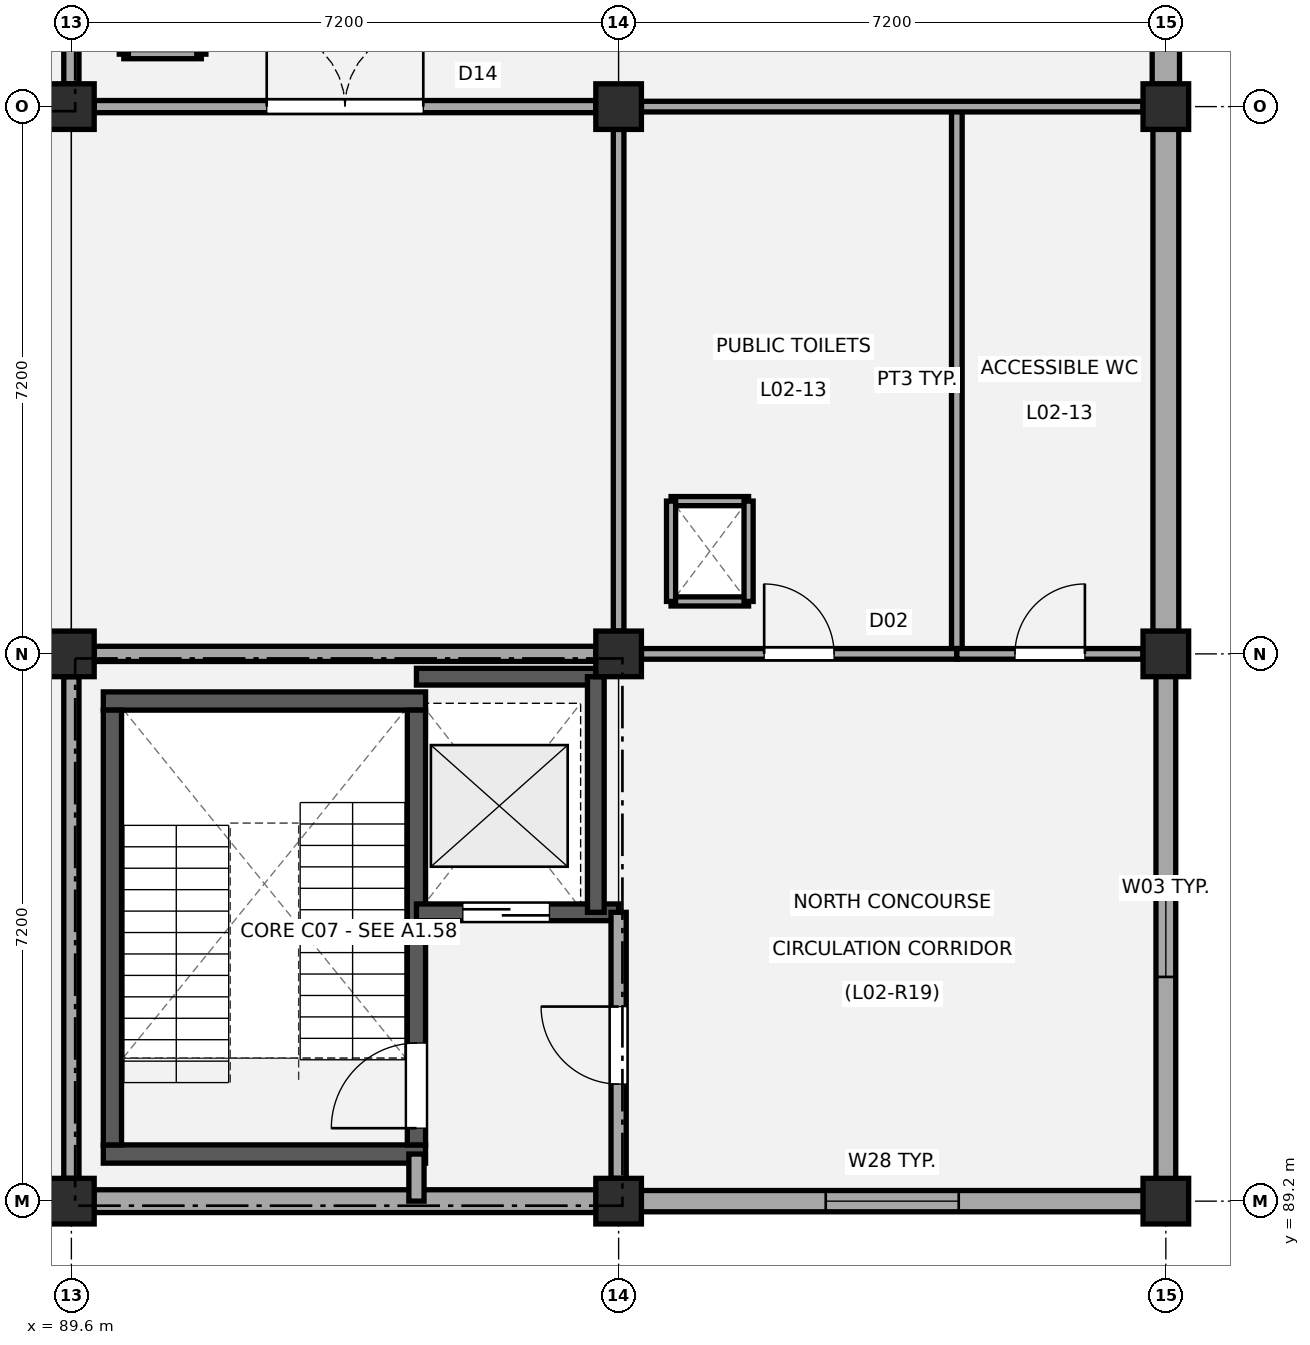
"""IFC4 building model, lengths in metres.
Left out: names, types, materials, properties, quantities, classifications, styles, units other than length and angle.
Written with IfcOpenShell. Run it as: python <this file> out.ifc"""

import sys

from ifc_helpers import new_model, si_unit, direction, frame, frame_2d, origin, origin_2d, place, context, subcontext, project, spatial, rectangle, extrude, element, fill, save


model = new_model("IFC4")
c1 = context("Model", 3, precision=1e-05, world=origin(), true_north=direction((0.0, 1.0)))
c2 = subcontext(c1, "Body", "Model", "MODEL_VIEW")
j1 = project(units=[si_unit("LENGTHUNIT", "METRE"), si_unit("PLANEANGLEUNIT", "RADIAN")], contexts=[c1])
p1 = place(None, origin())
s1 = spatial("IfcSite", under=j1, at=p1, CompositionType="ELEMENT")
p2 = place(p1, origin())
s2 = spatial("IfcBuilding", under=s1, at=p2, CompositionType="ELEMENT")
p3 = place(p2, frame((0.0, 0.0, 9.18)))
s3 = spatial("IfcBuildingStorey", under=s2, at=p3, CompositionType="ELEMENT", Elevation=9.18)
for number, where, z_axis, x_axis in (
    (1, (89.6, 89.2, 0.0), (0.0, 0.0, 1.0), (1.0, 0.0, 0.0)),
    (2, (89.6, 96.4, 0.0), (0.0, 0.0, 1.0), (1.0, 0.0, 0.0)),
    (3, (89.6, 103.6, 0.0), (0.0, 0.0, 1.0), (1.0, 0.0, 0.0)),
    (4, (96.8, 89.2, 0.0), (0.0, 0.0, 1.0), (1.0, 0.0, 0.0)),
    (5, (96.8, 96.4, 0.0), (0.0, 0.0, 1.0), (1.0, 0.0, 0.0)),
    (6, (96.8, 103.6, 0.0), (0.0, 0.0, 1.0), (1.0, 0.0, 0.0)),
    (7, (104.0, 89.2, 0.0), (0.0, 0.0, 1.0), (1.0, 0.0, 0.0)),
    (8, (104.0, 96.4, 0.0), (0.0, 0.0, 1.0), (1.0, 0.0, 0.0)),
    (9, (104.0, 103.6, 0.0), (0.0, 0.0, 1.0), (1.0, 0.0, 0.0)),
):
    element("IfcColumn", number, at=place(p3, frame(where, z_axis=z_axis, x_axis=x_axis)), inside=s3, PredefinedType="COLUMN", context=c2, shape_type="SweptSolid", body=[
        extrude(rectangle(XDim=0.6, YDim=0.6, at=origin_2d()), origin(), (0.0, 0.0, 1.0), 4.32),
    ])
p4 = place(p3, frame((96.505, 89.2, 0.0), z_axis=(0.0, 0.0, 1.0), x_axis=(-1.0, 0.0, 0.0)))
e10 = element("IfcWall", 10, at=p4, inside=s3, PredefinedType="STANDARD", context=c2, shape_type="SweptSolid", body=[
    extrude(rectangle(XDim=6.61, YDim=0.3, at=frame_2d((3.305, 0.0))), origin(), (0.0, 0.0, 1.0), 3.46),
])
p5 = place(p3, frame((103.705, 89.2, 0.0), z_axis=(0.0, 0.0, 1.0), x_axis=(-1.0, 0.0, 0.0)))
e11 = element("IfcWall", 11, at=p5, inside=s3, PredefinedType="STANDARD", context=c2, shape_type="SweptSolid", body=[
    extrude(rectangle(XDim=6.61, YDim=0.28, at=frame_2d((3.305, 0.0))), origin(), (0.0, 0.0, 1.0), 3.48),
])
p6 = place(p5, frame((2.43, 0.0, 0.95)))
e12 = element("IfcOpeningElement", 12, at=p6, cuts=e11, PredefinedType="OPENING", context=c2, shape_type="SweptSolid", body=[
    extrude(rectangle(XDim=1.75, YDim=1.3, at=frame_2d((0.875, 0.65))), frame((0.0, 0.15, 0.0), z_axis=(0.0, -1.0, 0.0), x_axis=(1.0, 0.0, 0.0)), (0.0, 0.0, 1.0), 0.3),
])
p7 = place(p3, frame((104.0, 96.105, 0.0), z_axis=(0.0, 0.0, 1.0), x_axis=(0.0, -1.0, 0.0)))
e13 = element("IfcWall", 13, at=p7, inside=s3, PredefinedType="STANDARD", context=c2, shape_type="SweptSolid", body=[
    extrude(rectangle(XDim=6.61, YDim=0.26, at=frame_2d((3.305, 0.0))), origin(), (0.0, 0.0, 1.0), 3.48),
])
p8 = place(p7, frame((2.655, 0.0, 0.95)))
e14 = element("IfcOpeningElement", 14, at=p8, cuts=e13, PredefinedType="OPENING", context=c2, shape_type="SweptSolid", body=[
    extrude(rectangle(XDim=1.3, YDim=1.55, at=frame_2d((0.65, 0.775))), frame((0.0, 0.14, 0.0), z_axis=(0.0, -1.0, 0.0), x_axis=(1.0, 0.0, 0.0)), (0.0, 0.0, 1.0), 0.28),
])
p9 = place(p3, frame((104.0, 103.305, 0.0), z_axis=(0.0, 0.0, 1.0), x_axis=(0.0, -1.0, 0.0)))
e15 = element("IfcWall", 15, at=p9, inside=s3, PredefinedType="STANDARD", context=c2, shape_type="SweptSolid", body=[
    extrude(rectangle(XDim=6.61, YDim=0.34, at=frame_2d((3.305, 0.0))), origin(), (0.0, 0.0, 1.0), 3.46),
])
p10 = place(p3, frame((104.0, 111.88, 0.0), z_axis=(0.0, 0.0, 1.0), x_axis=(0.0, -1.0, 0.0)))
e16 = element("IfcWall", 16, at=p10, inside=s3, PredefinedType="STANDARD", context=c2, shape_type="SweptSolid", body=[
    extrude(rectangle(XDim=7.985, YDim=0.36, at=frame_2d((3.992, 0.0))), origin(), (0.0, 0.0, 1.0), 3.48),
])
p11 = place(p10, frame((3.292, 0.0, 0.95)))
e17 = element("IfcOpeningElement", 17, at=p11, cuts=e16, PredefinedType="OPENING", context=c2, shape_type="SweptSolid", body=[
    extrude(rectangle(XDim=1.4, YDim=1.6, at=frame_2d((0.7, 0.8))), frame((0.0, 0.19, 0.0), z_axis=(0.0, -1.0, 0.0), x_axis=(1.0, 0.0, 0.0)), (0.0, 0.0, 1.0), 0.38),
])
p12 = place(p3, frame((89.6, 103.9, 0.0), z_axis=(0.0, 0.0, 1.0), x_axis=(0.0, 1.0, 0.0)))
e18 = element("IfcWall", 18, at=p12, inside=s3, PredefinedType="PARTITIONING", context=c2, shape_type="SweptSolid", body=[
    extrude(rectangle(XDim=3.5, YDim=0.2, at=frame_2d((1.75, 0.0))), origin(), (0.0, 0.0, 1.0), 3.36),
])
for number, where, z_axis, x_axis in (
    (19, (90.02, 89.82, 0.0), (0.0, 0.0, 1.0), (1.0, 0.0, 0.0)),
    (20, (90.02, 95.78, 0.0), (0.0, 0.0, 1.0), (1.0, 0.0, 0.0)),
):
    element("IfcWall", number, at=place(p3, frame(where, z_axis=z_axis, x_axis=x_axis)), inside=s3, PredefinedType="SHEAR", context=c2, shape_type="SweptSolid", body=[
        extrude(rectangle(XDim=4.24, YDim=0.24, at=frame_2d((2.12, 0.0))), origin(), (0.0, 0.0, 1.0), 4.02),
    ])
p13 = place(p3, frame((90.14, 89.94, 0.0), z_axis=(0.0, 0.0, 1.0), x_axis=(0.0, 1.0, 0.0)))
e21 = element("IfcWall", 21, at=p13, inside=s3, PredefinedType="SHEAR", context=c2, shape_type="SweptSolid", body=[
    extrude(rectangle(XDim=5.72, YDim=0.24, at=frame_2d((2.86, 0.0))), origin(), (0.0, 0.0, 1.0), 4.02),
])
p14 = place(p3, frame((94.14, 89.94, 0.0), z_axis=(0.0, 0.0, 1.0), x_axis=(0.0, 1.0, 0.0)))
e22 = element("IfcWall", 22, at=p14, inside=s3, PredefinedType="SHEAR", context=c2, shape_type="SweptSolid", body=[
    extrude(rectangle(XDim=5.72, YDim=0.24, at=frame_2d((2.86, 0.0))), origin(), (0.0, 0.0, 1.0), 4.02),
])
p15 = place(p14, frame((0.22, 0.0, 0.0)))
e23 = element("IfcOpeningElement", 23, at=p15, cuts=e22, PredefinedType="OPENING", context=c2, shape_type="SweptSolid", body=[
    extrude(rectangle(XDim=1.12, YDim=2.15, at=frame_2d((0.56, 1.075))), frame((0.0, 0.13, 0.0), z_axis=(0.0, -1.0, 0.0), x_axis=(1.0, 0.0, 0.0)), (0.0, 0.0, 1.0), 0.26),
])
p16 = place(p3, frame((94.14, 93.0, 0.0), z_axis=(0.0, 0.0, 1.0), x_axis=(1.0, 0.0, 0.0)))
e24 = element("IfcWall", 24, at=p16, inside=s3, PredefinedType="SHEAR", context=c2, shape_type="SweptSolid", body=[
    extrude(rectangle(XDim=2.66, YDim=0.22, at=frame_2d((1.33, 0.0))), origin(), (0.0, 0.0, 1.0), 4.02),
])
p17 = place(p16, frame((0.61, 0.0, 0.0)))
e25 = element("IfcOpeningElement", 25, at=p17, cuts=e24, PredefinedType="OPENING", context=c2, shape_type="SweptSolid", body=[
    extrude(rectangle(XDim=1.14, YDim=2.15, at=frame_2d((0.57, 1.075))), frame((0.0, 0.12, 0.0), z_axis=(0.0, -1.0, 0.0), x_axis=(1.0, 0.0, 0.0)), (0.0, 0.0, 1.0), 0.24),
])
p18 = place(p3, frame((94.14, 96.1, 0.0), z_axis=(0.0, 0.0, 1.0), x_axis=(1.0, 0.0, 0.0)))
e26 = element("IfcWall", 26, at=p18, inside=s3, PredefinedType="SHEAR", context=c2, shape_type="SweptSolid", body=[
    extrude(rectangle(XDim=2.36, YDim=0.22, at=frame_2d((1.18, 0.0))), origin(), (0.0, 0.0, 1.0), 4.02),
])
p19 = place(p3, frame((96.5, 93.0, 0.0), z_axis=(0.0, 0.0, 1.0), x_axis=(0.0, 1.0, 0.0)))
e27 = element("IfcWall", 27, at=p19, inside=s3, PredefinedType="SHEAR", context=c2, shape_type="SweptSolid", body=[
    extrude(rectangle(XDim=3.1, YDim=0.22, at=frame_2d((1.55, 0.0))), origin(), (0.0, 0.0, 1.0), 4.02),
])
p20 = place(p3, frame((94.14, 89.2, 0.0), z_axis=(0.0, 0.0, 1.0), x_axis=(0.0, 1.0, 0.0)))
e28 = element("IfcWall", 28, at=p20, inside=s3, PredefinedType="PARTITIONING", context=c2, shape_type="SweptSolid", body=[
    extrude(rectangle(XDim=0.62, YDim=0.2, at=frame_2d((0.31, 0.0))), origin(), (0.0, 0.0, 1.0), 3.46),
])
p21 = place(p3, frame((89.6, 89.5, 0.0), z_axis=(0.0, 0.0, 1.0), x_axis=(0.0, 1.0, 0.0)))
e29 = element("IfcWall", 29, at=p21, inside=s3, PredefinedType="PARTITIONING", context=c2, shape_type="SweptSolid", body=[
    extrude(rectangle(XDim=6.6, YDim=0.2, at=frame_2d((3.3, 0.0))), origin(), (0.0, 0.0, 1.0), 3.36),
])
p22 = place(p3, frame((96.8, 89.5, 0.0), z_axis=(0.0, 0.0, 1.0), x_axis=(0.0, 1.0, 0.0)))
e30 = element("IfcWall", 30, at=p22, inside=s3, PredefinedType="PARTITIONING", context=c2, shape_type="SweptSolid", body=[
    extrude(rectangle(XDim=3.5, YDim=0.2, at=frame_2d((1.75, 0.0))), origin(), (0.0, 0.0, 1.0), 3.36),
])
p23 = place(p22, frame((1.24, 0.0, 0.0)))
e31 = element("IfcOpeningElement", 31, at=p23, cuts=e30, PredefinedType="OPENING", context=c2, shape_type="SweptSolid", body=[
    extrude(rectangle(XDim=1.02, YDim=2.15, at=frame_2d((0.51, 1.075))), frame((0.0, 0.11, 0.0), z_axis=(0.0, -1.0, 0.0), x_axis=(1.0, 0.0, 0.0)), (0.0, 0.0, 1.0), 0.22),
])
p24 = place(p3, frame((89.9, 96.4, 0.0), z_axis=(0.0, 0.0, 1.0), x_axis=(1.0, 0.0, 0.0)))
e32 = element("IfcWall", 32, at=p24, inside=s3, PredefinedType="PARTITIONING", context=c2, shape_type="SweptSolid", body=[
    extrude(rectangle(XDim=6.6, YDim=0.2, at=frame_2d((3.3, 0.0))), origin(), (0.0, 0.0, 1.0), 3.41),
])
p25 = place(p3, frame((90.29, 104.29, 0.0), z_axis=(0.0, 0.0, 1.0), x_axis=(1.0, 0.0, 0.0)))
e33 = element("IfcWall", 33, at=p25, inside=s3, PredefinedType="PARTITIONING", context=c2, shape_type="SweptSolid", body=[
    extrude(rectangle(XDim=1.02, YDim=0.12, at=frame_2d((0.51, 0.0))), origin(), (0.0, 0.0, 1.0), 4.0),
])
for number, where, z_axis, x_axis in (
    (34, (90.29, 104.29, 0.0), (0.0, 0.0, 1.0), (0.0, 1.0, 0.0)),
    (35, (91.31, 104.29, 0.0), (0.0, 0.0, 1.0), (0.0, 1.0, 0.0)),
):
    element("IfcWall", number, at=place(p3, frame(where, z_axis=z_axis, x_axis=x_axis)), inside=s3, PredefinedType="PARTITIONING", context=c2, shape_type="SweptSolid", body=[
        extrude(rectangle(XDim=1.32, YDim=0.12, at=frame_2d((0.66, 0.0))), origin(), (0.0, 0.0, 1.0), 4.0),
    ])
for number, where, z_axis, x_axis in (
    (36, (97.49, 97.09, 0.0), (0.0, 0.0, 1.0), (1.0, 0.0, 0.0)),
    (37, (97.49, 98.41, 0.0), (0.0, 0.0, 1.0), (1.0, 0.0, 0.0)),
):
    element("IfcWall", number, at=place(p3, frame(where, z_axis=z_axis, x_axis=x_axis)), inside=s3, PredefinedType="PARTITIONING", context=c2, shape_type="SweptSolid", body=[
        extrude(rectangle(XDim=1.02, YDim=0.12, at=frame_2d((0.51, 0.0))), origin(), (0.0, 0.0, 1.0), 4.0),
    ])
for number, where, z_axis, x_axis in (
    (38, (97.49, 97.09, 0.0), (0.0, 0.0, 1.0), (0.0, 1.0, 0.0)),
    (39, (98.51, 97.09, 0.0), (0.0, 0.0, 1.0), (0.0, 1.0, 0.0)),
):
    element("IfcWall", number, at=place(p3, frame(where, z_axis=z_axis, x_axis=x_axis)), inside=s3, PredefinedType="PARTITIONING", context=c2, shape_type="SweptSolid", body=[
        extrude(rectangle(XDim=1.32, YDim=0.12, at=frame_2d((0.66, 0.0))), origin(), (0.0, 0.0, 1.0), 4.0),
    ])
p26 = place(p3, frame((101.25, 96.4, 0.0), z_axis=(0.0, 0.0, 1.0), x_axis=(0.0, 1.0, 0.0)))
e40 = element("IfcWall", 40, at=p26, inside=s3, PredefinedType="PARTITIONING", context=c2, shape_type="SweptSolid", body=[
    extrude(rectangle(XDim=7.2, YDim=0.14, at=frame_2d((3.6, 0.0))), origin(), (0.0, 0.0, 1.0), 3.44),
])
p27 = place(p3, frame((97.1, 96.4, 0.0), z_axis=(0.0, 0.0, 1.0), x_axis=(1.0, 0.0, 0.0)))
e41 = element("IfcWall", 41, at=p27, inside=s3, PredefinedType="PARTITIONING", context=c2, shape_type="SweptSolid", body=[
    extrude(rectangle(XDim=4.15, YDim=0.14, at=frame_2d((2.075, 0.0))), origin(), (0.0, 0.0, 1.0), 3.36),
])
p28 = place(p27, frame((1.615, 0.0, 0.0)))
e42 = element("IfcOpeningElement", 42, at=p28, cuts=e41, PredefinedType="OPENING", context=c2, shape_type="SweptSolid", body=[
    extrude(rectangle(XDim=0.92, YDim=2.08, at=frame_2d((0.46, 1.04))), frame((0.0, 0.08, 0.0), z_axis=(0.0, -1.0, 0.0), x_axis=(1.0, 0.0, 0.0)), (0.0, 0.0, 1.0), 0.16),
])
p29 = place(p3, frame((101.25, 96.4, 0.0), z_axis=(0.0, 0.0, 1.0), x_axis=(1.0, 0.0, 0.0)))
e43 = element("IfcWall", 43, at=p29, inside=s3, PredefinedType="PARTITIONING", context=c2, shape_type="SweptSolid", body=[
    extrude(rectangle(XDim=2.45, YDim=0.14, at=frame_2d((1.225, 0.0))), origin(), (0.0, 0.0, 1.0), 3.36),
])
p30 = place(p29, frame((0.765, 0.0, 0.0)))
e44 = element("IfcOpeningElement", 44, at=p30, cuts=e43, PredefinedType="OPENING", context=c2, shape_type="SweptSolid", body=[
    extrude(rectangle(XDim=0.92, YDim=2.08, at=frame_2d((0.46, 1.04))), frame((0.0, 0.08, 0.0), z_axis=(0.0, -1.0, 0.0), x_axis=(1.0, 0.0, 0.0)), (0.0, 0.0, 1.0), 0.16),
])
p31 = place(p3, frame((97.1, 103.6, 0.0), z_axis=(0.0, 0.0, 1.0), x_axis=(1.0, 0.0, 0.0)))
e45 = element("IfcWall", 45, at=p31, inside=s3, PredefinedType="PARTITIONING", context=c2, shape_type="SweptSolid", body=[
    extrude(rectangle(XDim=6.6, YDim=0.14, at=frame_2d((3.3, 0.0))), origin(), (0.0, 0.0, 1.0), 3.41),
])
p32 = place(p3, frame((96.8, 96.7, 0.0), z_axis=(0.0, 0.0, 1.0), x_axis=(0.0, 1.0, 0.0)))
e46 = element("IfcWall", 46, at=p32, inside=s3, PredefinedType="PARTITIONING", context=c2, shape_type="SweptSolid", body=[
    extrude(rectangle(XDim=6.6, YDim=0.14, at=frame_2d((3.3, 0.0))), origin(), (0.0, 0.0, 1.0), 3.41),
])
p33 = place(p3, frame((89.9, 103.6, 0.0), z_axis=(0.0, 0.0, 1.0), x_axis=(1.0, 0.0, 0.0)))
e47 = element("IfcWall", 47, at=p33, inside=s3, PredefinedType="PARTITIONING", context=c2, shape_type="SweptSolid", body=[
    extrude(rectangle(XDim=6.6, YDim=0.16, at=frame_2d((3.3, 0.0))), origin(), (0.0, 0.0, 1.0), 3.36),
])
p34 = place(p33, frame((2.27, 0.0, 0.0)))
e48 = element("IfcOpeningElement", 48, at=p34, cuts=e47, PredefinedType="OPENING", context=c2, shape_type="SweptSolid", body=[
    extrude(rectangle(XDim=2.06, YDim=2.28, at=frame_2d((1.03, 1.14))), frame((0.0, 0.09, 0.0), z_axis=(0.0, -1.0, 0.0), x_axis=(1.0, 0.0, 0.0)), (0.0, 0.0, 1.0), 0.18),
])
p35 = place(p6, origin())
e49 = element("IfcWindow", 49, at=p35, inside=s3, PartitioningType="SINGLE_PANEL", PredefinedType="WINDOW", context=c2, shape_type="SweptSolid", body=[
    extrude(rectangle(XDim=1.75, YDim=1.3, at=frame_2d((0.875, 0.65))), frame((0.0, 0.03, 0.0), z_axis=(0.0, -1.0, 0.0), x_axis=(1.0, 0.0, 0.0)), (0.0, 0.0, 1.0), 0.06),
])
fill(e12, e49)
p36 = place(p8, origin())
e50 = element("IfcWindow", 50, at=p36, inside=s3, PartitioningType="SINGLE_PANEL", PredefinedType="WINDOW", context=c2, shape_type="SweptSolid", body=[
    extrude(rectangle(XDim=1.3, YDim=1.55, at=frame_2d((0.65, 0.775))), frame((0.0, 0.03, 0.0), z_axis=(0.0, -1.0, 0.0), x_axis=(1.0, 0.0, 0.0)), (0.0, 0.0, 1.0), 0.06),
])
fill(e14, e50)
p37 = place(p15, origin())
e51 = element("IfcDoor", 51, at=p37, inside=s3, OperationType="SINGLE_SWING_LEFT", PredefinedType="DOOR", context=c2, shape_type="SweptSolid", body=[
    extrude(rectangle(XDim=1.12, YDim=2.15, at=frame_2d((0.56, 1.075))), frame((0.0, 0.025, 0.0), z_axis=(0.0, -1.0, 0.0), x_axis=(1.0, 0.0, 0.0)), (0.0, 0.0, 1.0), 0.05),
])
fill(e23, e51)
p38 = place(p17, origin())
e52 = element("IfcDoor", 52, at=p38, inside=s3, OperationType="SLIDING_TO_LEFT", PredefinedType="DOOR", context=c2, shape_type="SweptSolid", body=[
    extrude(rectangle(XDim=1.14, YDim=2.15, at=frame_2d((0.57, 1.075))), frame((0.0, 0.025, 0.0), z_axis=(0.0, -1.0, 0.0), x_axis=(1.0, 0.0, 0.0)), (0.0, 0.0, 1.0), 0.05),
])
fill(e25, e52)
p39 = place(p23, origin())
e53 = element("IfcDoor", 53, at=p39, inside=s3, OperationType="SINGLE_SWING_RIGHT", PredefinedType="DOOR", context=c2, shape_type="SweptSolid", body=[
    extrude(rectangle(XDim=1.02, YDim=2.15, at=frame_2d((0.51, 1.075))), frame((0.0, 0.025, 0.0), z_axis=(0.0, -1.0, 0.0), x_axis=(1.0, 0.0, 0.0)), (0.0, 0.0, 1.0), 0.05),
])
fill(e31, e53)
p40 = place(p28, origin())
e54 = element("IfcDoor", 54, at=p40, inside=s3, OperationType="SINGLE_SWING_LEFT", PredefinedType="DOOR", context=c2, shape_type="SweptSolid", body=[
    extrude(rectangle(XDim=0.92, YDim=2.08, at=frame_2d((0.46, 1.04))), frame((0.0, 0.025, 0.0), z_axis=(0.0, -1.0, 0.0), x_axis=(1.0, 0.0, 0.0)), (0.0, 0.0, 1.0), 0.05),
])
fill(e42, e54)
p41 = place(p30, origin())
e55 = element("IfcDoor", 55, at=p41, inside=s3, OperationType="SINGLE_SWING_RIGHT", PredefinedType="DOOR", context=c2, shape_type="SweptSolid", body=[
    extrude(rectangle(XDim=0.92, YDim=2.08, at=frame_2d((0.46, 1.04))), frame((0.0, 0.025, 0.0), z_axis=(0.0, -1.0, 0.0), x_axis=(1.0, 0.0, 0.0)), (0.0, 0.0, 1.0), 0.05),
])
fill(e44, e55)
p42 = place(p34, origin())
e56 = element("IfcDoor", 56, at=p42, inside=s3, OperationType="DOUBLE_DOOR_SINGLE_SWING", PredefinedType="DOOR", context=c2, shape_type="SweptSolid", body=[
    extrude(rectangle(XDim=2.06, YDim=2.28, at=frame_2d((1.03, 1.14))), frame((0.0, 0.025, 0.0), z_axis=(0.0, -1.0, 0.0), x_axis=(1.0, 0.0, 0.0)), (0.0, 0.0, 1.0), 0.05),
])
fill(e48, e56)
save(model, sys.argv[1])
